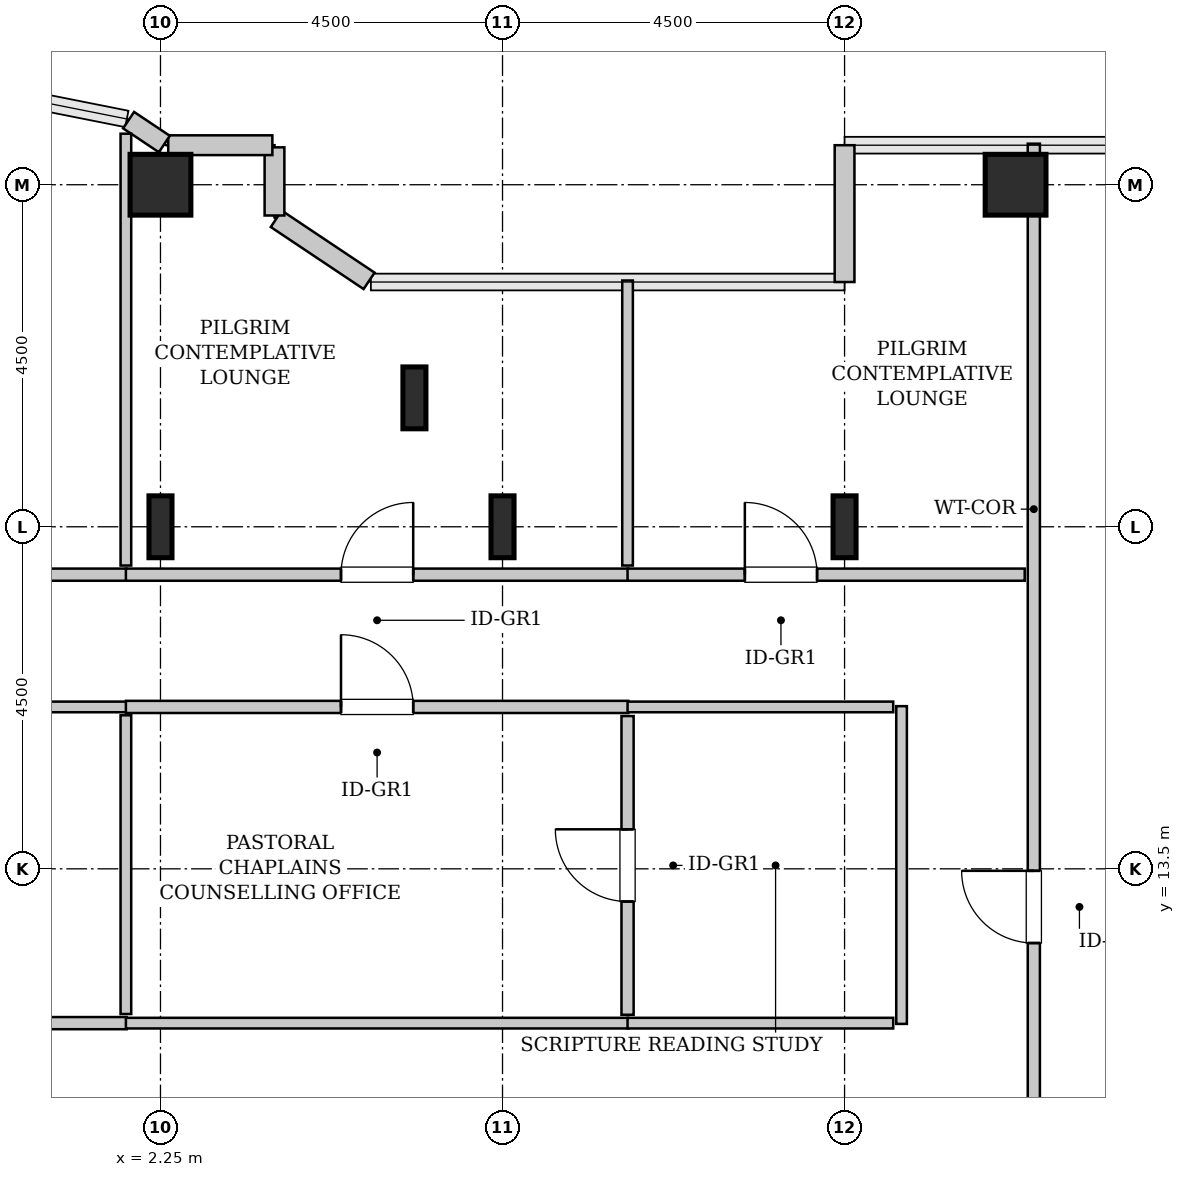
"""IFC4 building model, lengths in metres.
Left out: names, types, materials, properties, quantities, classifications, styles, units other than length and angle.
Written with IfcOpenShell. Run it as: python <this file> out.ifc"""

import sys

from ifc_helpers import new_model, si_unit, direction, frame, frame_2d, origin, origin_2d, place, context, subcontext, project, spatial, rectangle, hollow_rectangle, i_section, extrude, source, transform, mapped, element, fill, save


model = new_model("IFC4")
c1 = context("Model", 3, precision=1e-05, world=origin(), true_north=direction((0.0, 1.0)))
c2 = subcontext(c1, "Body", "Model", "MODEL_VIEW")
j1 = project(units=[si_unit("LENGTHUNIT", "METRE"), si_unit("PLANEANGLEUNIT", "RADIAN")], contexts=[c1])
p1 = place(None, origin())
s1 = spatial("IfcSite", under=j1, at=p1, CompositionType="ELEMENT")
p2 = place(p1, origin())
s2 = spatial("IfcBuilding", under=s1, at=p2, CompositionType="ELEMENT")
p3 = place(p2, frame((0.0, 0.0, 190.6)))
s3 = spatial("IfcBuildingStorey", under=s2, at=p3, CompositionType="ELEMENT", Elevation=190.6)
m1 = source(origin(), c2, "Body", "SweptSolid", [
    extrude(i_section(OverallWidth=0.303, OverallDepth=0.814, WebThickness=0.021, FlangeThickness=0.04, FilletRadius=0.03, at=origin_2d()), origin(), (0.0, 0.0, 1.0), 3.8),
])
p4 = place(p3, frame((2.25, 18.0, 0.0), z_axis=(0.0, 0.0, 1.0), x_axis=(1.0, 0.0, 0.0)))
e1 = element("IfcColumn", 1, at=p4, inside=s3, PredefinedType="COLUMN", context=c2, shape_type="MappedRepresentation", body=[
    mapped(m1, transform((0.0, 0.0, 0.0), x_axis=(1.0, 0.0, 0.0), y_axis=(0.0, 1.0, 0.0), z_axis=(0.0, 0.0, 1.0), scale=1.0)),
])
m2 = source(origin(), c2, "Body", "SweptSolid", [
    extrude(hollow_rectangle(XDim=0.8, YDim=0.8, WallThickness=0.04, InnerFilletRadius=0.04, OuterFilletRadius=0.08, at=origin_2d()), origin(), (0.0, 0.0, 1.0), 3.8),
])
p5 = place(p3, frame((2.25, 22.5, 0.0), z_axis=(0.0, 0.0, 1.0), x_axis=(1.0, 0.0, 0.0)))
e2 = element("IfcColumn", 2, at=p5, inside=s3, PredefinedType="COLUMN", context=c2, shape_type="MappedRepresentation", body=[
    mapped(m2, transform((0.0, 0.0, 0.0), x_axis=(1.0, 0.0, 0.0), y_axis=(0.0, 1.0, 0.0), z_axis=(0.0, 0.0, 1.0), scale=1.0)),
])
for number, where, z_axis, x_axis in (
    (3, (5.591, 19.696, 0.0), (0.0, 0.0, 1.0), (1.0, 0.0, 0.0)),
    (4, (6.75, 18.0, 0.0), (0.0, 0.0, 1.0), (1.0, 0.0, 0.0)),
    (5, (11.25, 18.0, 0.0), (0.0, 0.0, 1.0), (1.0, 0.0, 0.0)),
):
    element("IfcColumn", number, at=place(p3, frame(where, z_axis=z_axis, x_axis=x_axis)), inside=s3, PredefinedType="COLUMN", context=c2, shape_type="MappedRepresentation", body=[
        mapped(m1, transform((0.0, 0.0, 0.0), x_axis=(1.0, 0.0, 0.0), y_axis=(0.0, 1.0, 0.0), z_axis=(0.0, 0.0, 1.0), scale=1.0)),
    ])
p6 = place(p3, frame((13.5, 22.5, 0.0), z_axis=(0.0, 0.0, 1.0), x_axis=(1.0, 0.0, 0.0)))
e6 = element("IfcColumn", 6, at=p6, inside=s3, PredefinedType="COLUMN", context=c2, shape_type="MappedRepresentation", body=[
    mapped(m2, transform((0.0, 0.0, 0.0), x_axis=(1.0, 0.0, 0.0), y_axis=(0.0, 1.0, 0.0), z_axis=(0.0, 0.0, 1.0), scale=1.0)),
])
m3 = source(origin(), c2, "Body", "SweptSolid", [
    extrude(rectangle(XDim=1.8, YDim=0.26, at=frame_2d((0.9, 0.0))), origin(), (0.0, 0.0, 1.0), 3.55),
])
p7 = place(p3, frame((11.25, 23.02, 0.0), z_axis=(0.0, 0.0, 1.0), x_axis=(0.0, -1.0, 0.0)))
e7 = element("IfcWall", 7, at=p7, inside=s3, PredefinedType="SOLIDWALL", context=c2, shape_type="MappedRepresentation", body=[
    mapped(m3, transform((0.0, 0.0, 0.0), x_axis=(1.0, 0.0, 0.0), y_axis=(0.0, 1.0, 0.0), z_axis=(0.0, 0.0, 1.0), scale=1.0)),
])
m4 = source(origin(), c2, "Body", "SweptSolid", [
    extrude(rectangle(XDim=1.469, YDim=0.26, at=frame_2d((0.734, 0.0))), origin(), (0.0, 0.0, 1.0), 3.55),
])
p8 = place(p3, frame((4.995, 21.236, 0.0), z_axis=(0.0, 0.0, 1.0), x_axis=(-0.831461760506, 0.555581983884, 0.0)))
e8 = element("IfcWall", 8, at=p8, inside=s3, PredefinedType="SOLIDWALL", context=c2, shape_type="MappedRepresentation", body=[
    mapped(m4, transform((0.0, 0.0, 0.0), x_axis=(1.0, 0.0, 0.0), y_axis=(0.0, 1.0, 0.0), z_axis=(0.0, 0.0, 1.0), scale=1.0)),
])
m5 = source(origin(), c2, "Body", "SweptSolid", [
    extrude(rectangle(XDim=0.897, YDim=0.26, at=frame_2d((0.448, 0.0))), origin(), (0.0, 0.0, 1.0), 3.55),
])
p9 = place(p3, frame((3.75, 22.095, 0.0), z_axis=(0.0, 0.0, 1.0), x_axis=(0.0, 1.0, 0.0)))
e9 = element("IfcWall", 9, at=p9, inside=s3, PredefinedType="SOLIDWALL", context=c2, shape_type="MappedRepresentation", body=[
    mapped(m5, transform((0.0, 0.0, 0.0), x_axis=(1.0, 0.0, 0.0), y_axis=(0.0, 1.0, 0.0), z_axis=(0.0, 0.0, 1.0), scale=1.0)),
])
m6 = source(origin(), c2, "Body", "SweptSolid", [
    extrude(rectangle(XDim=1.37, YDim=0.26, at=frame_2d((0.685, 0.0))), origin(), (0.0, 0.0, 1.0), 3.55),
])
p10 = place(p3, frame((3.722, 23.02, 0.0), z_axis=(0.0, 0.0, 1.0), x_axis=(-1.0, 0.0, 0.0)))
e10 = element("IfcWall", 10, at=p10, inside=s3, PredefinedType="SOLIDWALL", context=c2, shape_type="MappedRepresentation", body=[
    mapped(m6, transform((0.0, 0.0, 0.0), x_axis=(1.0, 0.0, 0.0), y_axis=(0.0, 1.0, 0.0), z_axis=(0.0, 0.0, 1.0), scale=1.0)),
])
m7 = source(origin(), c2, "Body", "SweptSolid", [
    extrude(rectangle(XDim=0.565, YDim=0.26, at=frame_2d((0.283, 0.0))), origin(), (0.0, 0.0, 1.0), 3.55),
])
p11 = place(p3, frame((2.301, 23.036, 0.0), z_axis=(0.0, 0.0, 1.0), x_axis=(-0.831651492666, 0.555297933317, 0.0)))
e11 = element("IfcWall", 11, at=p11, inside=s3, PredefinedType="SOLIDWALL", context=c2, shape_type="MappedRepresentation", body=[
    mapped(m7, transform((0.0, 0.0, 0.0), x_axis=(1.0, 0.0, 0.0), y_axis=(0.0, 1.0, 0.0), z_axis=(0.0, 0.0, 1.0), scale=1.0)),
])
m8 = source(origin(), c2, "Body", "SweptSolid", [
    extrude(rectangle(XDim=14.453, YDim=0.16, at=frame_2d((7.226, 0.0))), origin(), (0.0, 0.0, 1.0), 3.535),
])
p12 = place(p3, frame((13.74, 8.587, 0.0), z_axis=(0.0, 0.0, 1.0), x_axis=(0.0, 1.0, 0.0)))
e12 = element("IfcWall", 12, at=p12, inside=s3, PredefinedType="PARTITIONING", context=c2, shape_type="MappedRepresentation", body=[
    mapped(m8, transform((0.0, 0.0, 0.0), x_axis=(1.0, 0.0, 0.0), y_axis=(0.0, 1.0, 0.0), z_axis=(0.0, 0.0, 1.0), scale=1.0)),
])
p13 = place(p12, frame((3.936, 0.0, 0.0)))
e13 = element("IfcOpeningElement", 13, at=p13, cuts=e12, PredefinedType="OPENING", context=c2, shape_type="SweptSolid", body=[
    extrude(rectangle(XDim=0.95, YDim=2.1, at=frame_2d((0.475, 1.05))), frame((0.0, 0.09, 0.0), z_axis=(0.0, -1.0, 0.0), x_axis=(1.0, 0.0, 0.0)), (0.0, 0.0, 1.0), 0.18),
])
m9 = source(origin(), c2, "Body", "SweptSolid", [
    extrude(rectangle(XDim=13.815, YDim=0.16, at=frame_2d((6.907, 0.0))), origin(), (0.0, 0.0, 1.0), 3.535),
])
p14 = place(p3, frame((-12.01, 11.47, 0.0), z_axis=(0.0, 0.0, 1.0), x_axis=(1.0, 0.0, 0.0)))
e14 = element("IfcWall", 14, at=p14, inside=s3, PredefinedType="PARTITIONING", context=c2, shape_type="MappedRepresentation", body=[
    mapped(m9, transform((0.0, 0.0, 0.0), x_axis=(1.0, 0.0, 0.0), y_axis=(0.0, 1.0, 0.0), z_axis=(0.0, 0.0, 1.0), scale=1.0)),
])
p15 = place(p14, frame((6.433, 0.0, 0.0)))
e15 = element("IfcOpeningElement", 15, at=p15, cuts=e14, PredefinedType="OPENING", context=c2, shape_type="SweptSolid", body=[
    extrude(rectangle(XDim=0.95, YDim=2.1, at=frame_2d((0.475, 1.05))), frame((0.0, 0.09, 0.0), z_axis=(0.0, -1.0, 0.0), x_axis=(1.0, 0.0, 0.0)), (0.0, 0.0, 1.0), 0.18),
])
m10 = source(origin(), c2, "Body", "SweptSolid", [
    extrude(rectangle(XDim=13.815, YDim=0.14, at=frame_2d((6.907, 0.0))), origin(), (0.0, 0.0, 1.0), 3.535),
])
p16 = place(p3, frame((-12.01, 15.63, 0.0), z_axis=(0.0, 0.0, 1.0), x_axis=(1.0, 0.0, 0.0)))
e16 = element("IfcWall", 16, at=p16, inside=s3, PredefinedType="PARTITIONING", context=c2, shape_type="MappedRepresentation", body=[
    mapped(m10, transform((0.0, 0.0, 0.0), x_axis=(1.0, 0.0, 0.0), y_axis=(0.0, 1.0, 0.0), z_axis=(0.0, 0.0, 1.0), scale=1.0)),
])
m11 = source(origin(), c2, "Body", "SweptSolid", [
    extrude(rectangle(XDim=3.93, YDim=0.14, at=frame_2d((1.965, 0.0))), origin(), (0.0, 0.0, 1.0), 3.535),
])
p17 = place(p3, frame((1.795, 11.59, 0.0), z_axis=(0.0, 0.0, 1.0), x_axis=(0.0, 1.0, 0.0)))
e17 = element("IfcWall", 17, at=p17, inside=s3, PredefinedType="PARTITIONING", context=c2, shape_type="MappedRepresentation", body=[
    mapped(m11, transform((0.0, 0.0, 0.0), x_axis=(1.0, 0.0, 0.0), y_axis=(0.0, 1.0, 0.0), z_axis=(0.0, 0.0, 1.0), scale=1.0)),
])
m12 = source(origin(), c2, "Body", "SweptSolid", [
    extrude(rectangle(XDim=9.245, YDim=0.16, at=frame_2d((4.623, 0.0))), origin(), (0.0, 0.0, 1.0), 3.535),
])
p18 = place(p3, frame((-7.44, 17.37, 0.0), z_axis=(0.0, 0.0, 1.0), x_axis=(1.0, 0.0, 0.0)))
e18 = element("IfcWall", 18, at=p18, inside=s3, PredefinedType="PARTITIONING", context=c2, shape_type="MappedRepresentation", body=[
    mapped(m12, transform((0.0, 0.0, 0.0), x_axis=(1.0, 0.0, 0.0), y_axis=(0.0, 1.0, 0.0), z_axis=(0.0, 0.0, 1.0), scale=1.0)),
])
p19 = place(p18, frame((3.529, 0.0, 0.0)))
e19 = element("IfcOpeningElement", 19, at=p19, cuts=e18, PredefinedType="OPENING", context=c2, shape_type="SweptSolid", body=[
    extrude(rectangle(XDim=0.95, YDim=2.1, at=frame_2d((0.475, 1.05))), frame((0.0, 0.09, 0.0), z_axis=(0.0, -1.0, 0.0), x_axis=(1.0, 0.0, 0.0)), (0.0, 0.0, 1.0), 0.18),
])
m13 = source(origin(), c2, "Body", "SweptSolid", [
    extrude(rectangle(XDim=5.681, YDim=0.14, at=frame_2d((2.841, 0.0))), origin(), (0.0, 0.0, 1.0), 2.875),
])
p20 = place(p3, frame((1.795, 17.49, 0.0), z_axis=(0.0, 0.0, 1.0), x_axis=(0.0, 1.0, 0.0)))
e20 = element("IfcWall", 20, at=p20, inside=s3, PredefinedType="PARTITIONING", context=c2, shape_type="MappedRepresentation", body=[
    mapped(m13, transform((0.0, 0.0, 0.0), x_axis=(1.0, 0.0, 0.0), y_axis=(0.0, 1.0, 0.0), z_axis=(0.0, 0.0, 1.0), scale=1.0)),
])
m14 = source(origin(), c2, "Body", "SweptSolid", [
    extrude(rectangle(XDim=6.61, YDim=0.16, at=frame_2d((3.305, 0.0))), origin(), (0.0, 0.0, 1.0), 3.535),
])
p21 = place(p3, frame((1.795, 17.37, 0.0), z_axis=(0.0, 0.0, 1.0), x_axis=(1.0, 0.0, 0.0)))
e21 = element("IfcWall", 21, at=p21, inside=s3, PredefinedType="PARTITIONING", context=c2, shape_type="MappedRepresentation", body=[
    mapped(m14, transform((0.0, 0.0, 0.0), x_axis=(1.0, 0.0, 0.0), y_axis=(0.0, 1.0, 0.0), z_axis=(0.0, 0.0, 1.0), scale=1.0)),
])
p22 = place(p21, frame((2.83, 0.0, 0.0)))
e22 = element("IfcOpeningElement", 22, at=p22, cuts=e21, PredefinedType="OPENING", context=c2, shape_type="SweptSolid", body=[
    extrude(rectangle(XDim=0.95, YDim=2.1, at=frame_2d((0.475, 1.05))), frame((0.0, 0.09, 0.0), z_axis=(0.0, -1.0, 0.0), x_axis=(1.0, 0.0, 0.0)), (0.0, 0.0, 1.0), 0.18),
])
m15 = source(origin(), c2, "Body", "SweptSolid", [
    extrude(rectangle(XDim=3.75, YDim=0.14, at=frame_2d((1.875, 0.0))), origin(), (0.0, 0.0, 1.0), 3.535),
])
p23 = place(p3, frame((8.395, 17.49, 0.0), z_axis=(0.0, 0.0, 1.0), x_axis=(0.0, 1.0, 0.0)))
e23 = element("IfcWall", 23, at=p23, inside=s3, PredefinedType="PARTITIONING", context=c2, shape_type="MappedRepresentation", body=[
    mapped(m15, transform((0.0, 0.0, 0.0), x_axis=(1.0, 0.0, 0.0), y_axis=(0.0, 1.0, 0.0), z_axis=(0.0, 0.0, 1.0), scale=1.0)),
])
p24 = place(p3, frame((1.795, 15.63, 0.0), z_axis=(0.0, 0.0, 1.0), x_axis=(1.0, 0.0, 0.0)))
e24 = element("IfcWall", 24, at=p24, inside=s3, PredefinedType="PARTITIONING", context=c2, shape_type="MappedRepresentation", body=[
    mapped(m14, transform((0.0, 0.0, 0.0), x_axis=(1.0, 0.0, 0.0), y_axis=(0.0, 1.0, 0.0), z_axis=(0.0, 0.0, 1.0), scale=1.0)),
])
p25 = place(p24, frame((2.83, 0.0, 0.0)))
e25 = element("IfcOpeningElement", 25, at=p25, cuts=e24, PredefinedType="OPENING", context=c2, shape_type="SweptSolid", body=[
    extrude(rectangle(XDim=0.95, YDim=2.1, at=frame_2d((0.475, 1.05))), frame((0.0, 0.09, 0.0), z_axis=(0.0, -1.0, 0.0), x_axis=(1.0, 0.0, 0.0)), (0.0, 0.0, 1.0), 0.18),
])
m16 = source(origin(), c2, "Body", "SweptSolid", [
    extrude(rectangle(XDim=6.61, YDim=0.14, at=frame_2d((3.305, 0.0))), origin(), (0.0, 0.0, 1.0), 3.535),
])
p26 = place(p3, frame((1.795, 11.47, 0.0), z_axis=(0.0, 0.0, 1.0), x_axis=(1.0, 0.0, 0.0)))
e26 = element("IfcWall", 26, at=p26, inside=s3, PredefinedType="PARTITIONING", context=c2, shape_type="MappedRepresentation", body=[
    mapped(m16, transform((0.0, 0.0, 0.0), x_axis=(1.0, 0.0, 0.0), y_axis=(0.0, 1.0, 0.0), z_axis=(0.0, 0.0, 1.0), scale=1.0)),
])
m17 = source(origin(), c2, "Body", "SweptSolid", [
    extrude(rectangle(XDim=3.93, YDim=0.16, at=frame_2d((1.965, 0.0))), origin(), (0.0, 0.0, 1.0), 3.535),
])
p27 = place(p3, frame((8.395, 11.58, 0.0), z_axis=(0.0, 0.0, 1.0), x_axis=(0.0, 1.0, 0.0)))
e27 = element("IfcWall", 27, at=p27, inside=s3, PredefinedType="PARTITIONING", context=c2, shape_type="MappedRepresentation", body=[
    mapped(m17, transform((0.0, 0.0, 0.0), x_axis=(1.0, 0.0, 0.0), y_axis=(0.0, 1.0, 0.0), z_axis=(0.0, 0.0, 1.0), scale=1.0)),
])
p28 = place(p27, frame((1.49, 0.0, 0.0)))
e28 = element("IfcOpeningElement", 28, at=p28, cuts=e27, PredefinedType="OPENING", context=c2, shape_type="SweptSolid", body=[
    extrude(rectangle(XDim=0.95, YDim=2.1, at=frame_2d((0.475, 1.05))), frame((0.0, 0.09, 0.0), z_axis=(0.0, -1.0, 0.0), x_axis=(1.0, 0.0, 0.0)), (0.0, 0.0, 1.0), 0.18),
])
m18 = source(origin(), c2, "Body", "SweptSolid", [
    extrude(rectangle(XDim=5.225, YDim=0.16, at=frame_2d((2.613, 0.0))), origin(), (0.0, 0.0, 1.0), 3.535),
])
p29 = place(p3, frame((8.395, 17.37, 0.0), z_axis=(0.0, 0.0, 1.0), x_axis=(1.0, 0.0, 0.0)))
e29 = element("IfcWall", 29, at=p29, inside=s3, PredefinedType="PARTITIONING", context=c2, shape_type="MappedRepresentation", body=[
    mapped(m18, transform((0.0, 0.0, 0.0), x_axis=(1.0, 0.0, 0.0), y_axis=(0.0, 1.0, 0.0), z_axis=(0.0, 0.0, 1.0), scale=1.0)),
])
p30 = place(p29, frame((1.543, 0.0, 0.0)))
e30 = element("IfcOpeningElement", 30, at=p30, cuts=e29, PredefinedType="OPENING", context=c2, shape_type="SweptSolid", body=[
    extrude(rectangle(XDim=0.95, YDim=2.1, at=frame_2d((0.475, 1.05))), frame((0.0, 0.09, 0.0), z_axis=(0.0, -1.0, 0.0), x_axis=(1.0, 0.0, 0.0)), (0.0, 0.0, 1.0), 0.18),
])
m19 = source(origin(), c2, "Body", "SweptSolid", [
    extrude(rectangle(XDim=4.18, YDim=0.14, at=frame_2d((2.09, 0.0))), origin(), (0.0, 0.0, 1.0), 3.535),
])
p31 = place(p3, frame((12.0, 11.46, 0.0), z_axis=(0.0, 0.0, 1.0), x_axis=(0.0, 1.0, 0.0)))
e31 = element("IfcWall", 31, at=p31, inside=s3, PredefinedType="PARTITIONING", context=c2, shape_type="MappedRepresentation", body=[
    mapped(m19, transform((0.0, 0.0, 0.0), x_axis=(1.0, 0.0, 0.0), y_axis=(0.0, 1.0, 0.0), z_axis=(0.0, 0.0, 1.0), scale=1.0)),
])
m20 = source(origin(), c2, "Body", "SweptSolid", [
    extrude(rectangle(XDim=3.495, YDim=0.14, at=frame_2d((1.748, 0.0))), origin(), (0.0, 0.0, 1.0), 3.535),
])
for number, where, z_axis, x_axis in (
    (32, (8.395, 15.63, 0.0), (0.0, 0.0, 1.0), (1.0, 0.0, 0.0)),
    (33, (8.395, 11.47, 0.0), (0.0, 0.0, 1.0), (1.0, 0.0, 0.0)),
):
    element("IfcWall", number, at=place(p3, frame(where, z_axis=z_axis, x_axis=x_axis)), inside=s3, PredefinedType="PARTITIONING", context=c2, shape_type="MappedRepresentation", body=[
        mapped(m20, transform((0.0, 0.0, 0.0), x_axis=(1.0, 0.0, 0.0), y_axis=(0.0, 1.0, 0.0), z_axis=(0.0, 0.0, 1.0), scale=1.0)),
    ])
m21 = source(origin(), c2, "Body", "SweptSolid", [
    extrude(rectangle(XDim=0.95, YDim=2.1, at=frame_2d((0.475, 1.05))), frame((0.0, 0.025, 0.0), z_axis=(0.0, -1.0, 0.0), x_axis=(1.0, 0.0, 0.0)), (0.0, 0.0, 1.0), 0.05),
])
p32 = place(p13, origin())
e34 = element("IfcDoor", 34, at=p32, inside=s3, OperationType="SINGLE_SWING_RIGHT", PredefinedType="DOOR", context=c2, shape_type="MappedRepresentation", body=[
    mapped(m21, transform((0.0, 0.0, 0.0), x_axis=(1.0, 0.0, 0.0), y_axis=(0.0, 1.0, 0.0), z_axis=(0.0, 0.0, 1.0), scale=1.0)),
])
fill(e13, e34)
p33 = place(p22, origin())
e35 = element("IfcDoor", 35, at=p33, inside=s3, OperationType="SINGLE_SWING_RIGHT", PredefinedType="DOOR", context=c2, shape_type="MappedRepresentation", body=[
    mapped(m21, transform((0.0, 0.0, 0.0), x_axis=(1.0, 0.0, 0.0), y_axis=(0.0, 1.0, 0.0), z_axis=(0.0, 0.0, 1.0), scale=1.0)),
])
fill(e22, e35)
p34 = place(p25, origin())
e36 = element("IfcDoor", 36, at=p34, inside=s3, OperationType="SINGLE_SWING_LEFT", PredefinedType="DOOR", context=c2, shape_type="MappedRepresentation", body=[
    mapped(m21, transform((0.0, 0.0, 0.0), x_axis=(1.0, 0.0, 0.0), y_axis=(0.0, 1.0, 0.0), z_axis=(0.0, 0.0, 1.0), scale=1.0)),
])
fill(e25, e36)
p35 = place(p28, origin())
e37 = element("IfcDoor", 37, at=p35, inside=s3, OperationType="SINGLE_SWING_RIGHT", PredefinedType="DOOR", context=c2, shape_type="MappedRepresentation", body=[
    mapped(m21, transform((0.0, 0.0, 0.0), x_axis=(1.0, 0.0, 0.0), y_axis=(0.0, 1.0, 0.0), z_axis=(0.0, 0.0, 1.0), scale=1.0)),
])
fill(e28, e37)
p36 = place(p30, origin())
e38 = element("IfcDoor", 38, at=p36, inside=s3, OperationType="SINGLE_SWING_LEFT", PredefinedType="DOOR", context=c2, shape_type="MappedRepresentation", body=[
    mapped(m21, transform((0.0, 0.0, 0.0), x_axis=(1.0, 0.0, 0.0), y_axis=(0.0, 1.0, 0.0), z_axis=(0.0, 0.0, 1.0), scale=1.0)),
])
fill(e30, e38)
save(model, sys.argv[1])
